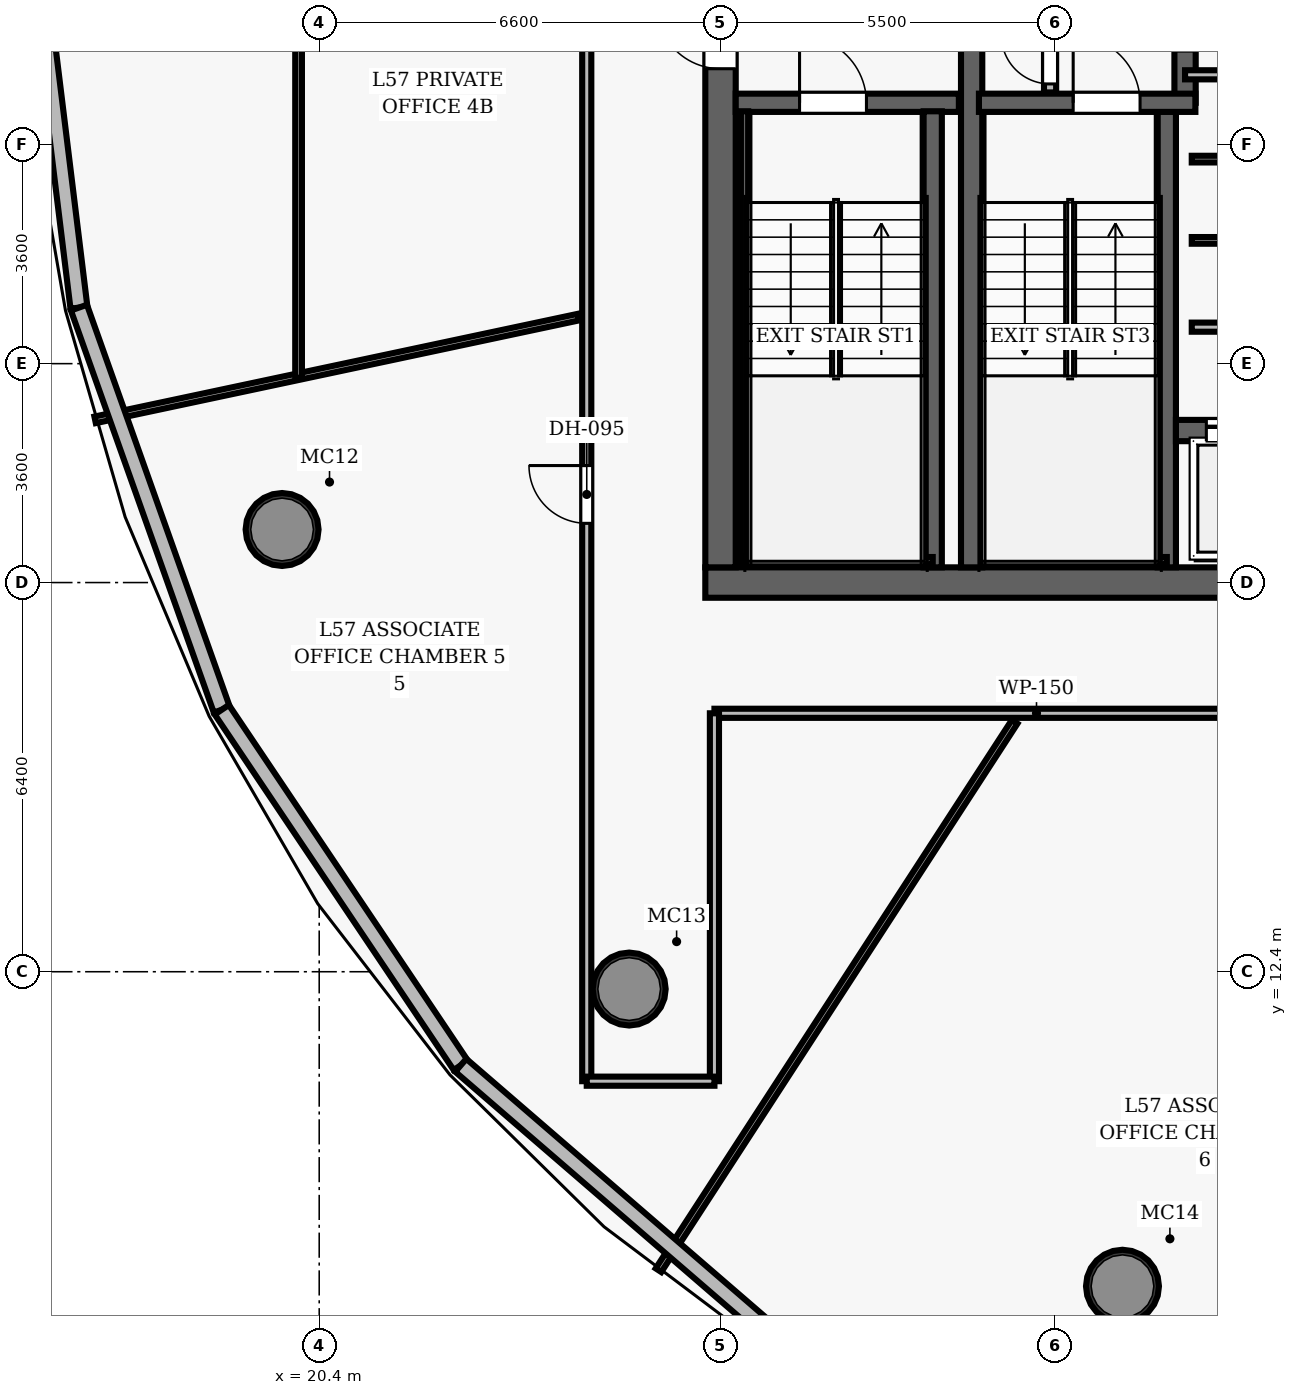
"""IFC4 building model, lengths in metres.
Left out: names, types, materials, properties, quantities, classifications, styles, units other than length and angle.
Written with IfcOpenShell. Run it as: python <this file> out.ifc"""

import sys

from ifc_helpers import new_model, si_unit, direction, frame, frame_2d, origin, origin_2d, place, context, subcontext, project, spatial, rectangle, hollow_circle, extrude, element, fill, save


model = new_model("IFC4")
c1 = context("Model", 3, precision=1e-05, world=origin(), true_north=direction((0.0, 1.0)))
c2 = subcontext(c1, "Body", "Model", "MODEL_VIEW")
j1 = project(units=[si_unit("LENGTHUNIT", "METRE"), si_unit("PLANEANGLEUNIT", "RADIAN")], contexts=[c1])
p1 = place(None, origin())
s1 = spatial("IfcSite", under=j1, at=p1, CompositionType="ELEMENT")
p2 = place(p1, origin())
s2 = spatial("IfcBuilding", under=s1, at=p2, CompositionType="ELEMENT")
p3 = place(p2, frame((0.0, 0.0, 225.1)))
s3 = spatial("IfcBuildingStorey", under=s2, at=p3, CompositionType="ELEMENT", Elevation=225.1)
p4 = place(p3, frame((26.75, 18.8, 0.0), z_axis=(0.0, 0.0, 1.0), x_axis=(1.0, 0.0, 0.0)))
e1 = element("IfcWall", 1, at=p4, inside=s3, PredefinedType="SHEAR", context=c2, shape_type="SweptSolid", body=[
    extrude(rectangle(XDim=22.5, YDim=0.5, at=frame_2d((11.25, 0.0))), origin(), (0.0, 0.0, 1.0), 3.85),
])
p5 = place(p4, frame((14.47, 0.0, 0.0)))
e2 = element("IfcOpeningElement", 2, at=p5, cuts=e1, PredefinedType="OPENING", context=c2, shape_type="SweptSolid", body=[
    extrude(rectangle(XDim=1.05, YDim=2.15, at=frame_2d((0.525, 1.075))), frame((0.0, 0.26, 0.0), z_axis=(0.0, -1.0, 0.0), x_axis=(1.0, 0.0, 0.0)), (0.0, 0.0, 1.0), 0.52),
])
p6 = place(p3, frame((27.0, 19.05, 0.0), z_axis=(0.0, 0.0, 1.0), x_axis=(0.0, 1.0, 0.0)))
e3 = element("IfcWall", 3, at=p6, inside=s3, PredefinedType="SHEAR", context=c2, shape_type="SweptSolid", body=[
    extrude(rectangle(XDim=13.9, YDim=0.5, at=frame_2d((6.95, 0.0))), origin(), (0.0, 0.0, 1.0), 3.85),
])
p7 = place(p6, frame((8.2, 0.0, 0.0)))
e4 = element("IfcOpeningElement", 4, at=p7, cuts=e3, PredefinedType="OPENING", context=c2, shape_type="SweptSolid", body=[
    extrude(rectangle(XDim=1.05, YDim=2.15, at=frame_2d((0.525, 1.075))), frame((0.0, 0.26, 0.0), z_axis=(0.0, -1.0, 0.0), x_axis=(1.0, 0.0, 0.0)), (0.0, 0.0, 1.0), 0.52),
])
p8 = place(p3, frame((31.13, 19.05, 0.0), z_axis=(0.0, 0.0, 1.0), x_axis=(0.0, 1.0, 0.0)))
e5 = element("IfcWall", 5, at=p8, inside=s3, PredefinedType="SHEAR", context=c2, shape_type="SweptSolid", body=[
    extrude(rectangle(XDim=13.9, YDim=0.35, at=frame_2d((6.95, 0.0))), origin(), (0.0, 0.0, 1.0), 3.85),
])
for number, where, z_axis, x_axis in (
    (6, (19.79, 19.673, 0.0), (0.0, 0.0, 1.0), (1.0, 0.0, 0.0)),
    (7, (25.498, 12.115, 0.0), (0.0, 0.0, 1.0), (1.0, 0.0, 0.0)),
    (8, (33.611, 7.228, 0.0), (0.0, 0.0, 1.0), (1.0, 0.0, 0.0)),
):
    element("IfcColumn", number, at=place(p3, frame(where, z_axis=z_axis, x_axis=x_axis)), inside=s3, PredefinedType="COLUMN", context=c2, shape_type="SweptSolid", body=[
        extrude(hollow_circle(Radius=0.6, WallThickness=0.05, at=origin_2d()), origin(), (0.0, 0.0, 1.0), 3.85),
    ])
p9 = place(p3, frame((27.25, 26.69, 0.0), z_axis=(0.0, 0.0, 1.0), x_axis=(1.0, 0.0, 0.0)))
e9 = element("IfcWall", 9, at=p9, inside=s3, PredefinedType="SHEAR", context=c2, shape_type="SweptSolid", body=[
    extrude(rectangle(XDim=3.67, YDim=0.3, at=frame_2d((1.835, 0.0))), origin(), (0.0, 0.0, 1.0), 3.85),
])
p10 = place(p9, frame((1.05, 0.0, 0.0)))
e10 = element("IfcOpeningElement", 10, at=p10, cuts=e9, PredefinedType="OPENING", context=c2, shape_type="SweptSolid", body=[
    extrude(rectangle(XDim=1.1, YDim=2.15, at=frame_2d((0.55, 1.075))), frame((0.0, 0.16, 0.0), z_axis=(0.0, -1.0, 0.0), x_axis=(1.0, 0.0, 0.0)), (0.0, 0.0, 1.0), 0.32),
])
p11 = place(p3, frame((30.49, 19.05, 0.0), z_axis=(0.0, 0.0, 1.0), x_axis=(0.0, 1.0, 0.0)))
e11 = element("IfcWall", 11, at=p11, inside=s3, PredefinedType="SHEAR", context=c2, shape_type="SweptSolid", body=[
    extrude(rectangle(XDim=7.5, YDim=0.3, at=frame_2d((3.75, 0.0))), origin(), (0.0, 0.0, 1.0), 3.85),
])
p12 = place(p3, frame((27.395, 19.1, 0.0), z_axis=(0.0, 0.0, 1.0), x_axis=(0.0, 1.0, 0.0)))
e12 = element("IfcWall", 12, at=p12, inside=s3, PredefinedType="SHEAR", context=c2, shape_type="SweptSolid", body=[
    extrude(rectangle(XDim=7.45, YDim=0.12, at=frame_2d((3.725, 0.0))), origin(), (0.0, 0.0, 1.0), 3.85),
])
p13 = place(p3, frame((27.395, 19.16, 0.0), z_axis=(0.0, 0.0, 1.0), x_axis=(1.0, 0.0, 0.0)))
e13 = element("IfcWall", 13, at=p13, inside=s3, PredefinedType="SHEAR", context=c2, shape_type="SweptSolid", body=[
    extrude(rectangle(XDim=3.095, YDim=0.12, at=frame_2d((1.547, 0.0))), origin(), (0.0, 0.0, 1.0), 3.85),
])
p14 = place(p3, frame((34.34, 19.05, 0.0), z_axis=(0.0, 0.0, 1.0), x_axis=(0.0, 1.0, 0.0)))
e14 = element("IfcWall", 14, at=p14, inside=s3, PredefinedType="SHEAR", context=c2, shape_type="SweptSolid", body=[
    extrude(rectangle(XDim=7.5, YDim=0.3, at=frame_2d((3.75, 0.0))), origin(), (0.0, 0.0, 1.0), 3.85),
])
p15 = place(p3, frame((34.64, 26.69, 0.0), z_axis=(0.0, 0.0, 1.0), x_axis=(0.0, 1.0, 0.0)))
e15 = element("IfcWall", 15, at=p15, inside=s3, PredefinedType="SHEAR", context=c2, shape_type="SweptSolid", body=[
    extrude(rectangle(XDim=6.26, YDim=0.35, at=frame_2d((3.13, 0.0))), origin(), (0.0, 0.0, 1.0), 3.85),
])
p16 = place(p15, frame((0.85, 0.0, 0.0)))
e16 = element("IfcOpeningElement", 16, at=p16, cuts=e15, PredefinedType="OPENING", context=c2, shape_type="SweptSolid", body=[
    extrude(rectangle(XDim=1.05, YDim=2.15, at=frame_2d((0.525, 1.075))), frame((0.0, 0.185, 0.0), z_axis=(0.0, -1.0, 0.0), x_axis=(1.0, 0.0, 0.0)), (0.0, 0.0, 1.0), 0.37),
])
p17 = place(p3, frame((31.25, 26.69, 0.0), z_axis=(0.0, 0.0, 1.0), x_axis=(1.0, 0.0, 0.0)))
e17 = element("IfcWall", 17, at=p17, inside=s3, PredefinedType="SHEAR", context=c2, shape_type="SweptSolid", body=[
    extrude(rectangle(XDim=3.56, YDim=0.3, at=frame_2d((1.78, 0.0))), origin(), (0.0, 0.0, 1.0), 3.85),
])
p18 = place(p17, frame((1.55, 0.0, 0.0)))
e18 = element("IfcOpeningElement", 18, at=p18, cuts=e17, PredefinedType="OPENING", context=c2, shape_type="SweptSolid", body=[
    extrude(rectangle(XDim=1.1, YDim=2.15, at=frame_2d((0.55, 1.075))), frame((0.0, 0.16, 0.0), z_axis=(0.0, -1.0, 0.0), x_axis=(1.0, 0.0, 0.0)), (0.0, 0.0, 1.0), 0.32),
])
p19 = place(p3, frame((31.3, 19.16, 0.0), z_axis=(0.0, 0.0, 1.0), x_axis=(1.0, 0.0, 0.0)))
e19 = element("IfcWall", 19, at=p19, inside=s3, PredefinedType="SHEAR", context=c2, shape_type="SweptSolid", body=[
    extrude(rectangle(XDim=3.04, YDim=0.12, at=frame_2d((1.52, 0.0))), origin(), (0.0, 0.0, 1.0), 3.85),
])
p20 = place(p3, frame((32.42, 26.86, 0.0), z_axis=(0.0, 0.0, 1.0), x_axis=(0.0, 1.0, 0.0)))
e20 = element("IfcWall", 20, at=p20, inside=s3, PredefinedType="PARTITIONING", context=c2, shape_type="SweptSolid", body=[
    extrude(rectangle(XDim=2.04, YDim=0.2, at=frame_2d((1.02, 0.0))), origin(), (0.0, 0.0, 1.0), 3.035),
])
p21 = place(p20, frame((0.14, 0.0, 0.0)))
e21 = element("IfcOpeningElement", 21, at=p21, cuts=e20, PredefinedType="OPENING", context=c2, shape_type="SweptSolid", body=[
    extrude(rectangle(XDim=0.8, YDim=2.05, at=frame_2d((0.4, 1.025))), frame((0.0, 0.11, 0.0), z_axis=(0.0, -1.0, 0.0), x_axis=(1.0, 0.0, 0.0)), (0.0, 0.0, 1.0), 0.22),
])
p22 = place(p3, frame((34.49, 21.3, 0.0), z_axis=(0.0, 0.0, 1.0), x_axis=(1.0, 0.0, 0.0)))
e22 = element("IfcWall", 22, at=p22, inside=s3, PredefinedType="SHEAR", context=c2, shape_type="SweptSolid", body=[
    extrude(rectangle(XDim=6.68, YDim=0.35, at=frame_2d((3.34, 0.0))), origin(), (0.0, 0.0, 1.0), 3.035),
])
p23 = place(p22, frame((0.5, 0.0, 0.0)))
e23 = element("IfcOpeningElement", 23, at=p23, cuts=e22, PredefinedType="OPENING", context=c2, shape_type="SweptSolid", body=[
    extrude(rectangle(XDim=0.9, YDim=2.15, at=frame_2d((0.45, 1.075))), frame((0.0, 0.185, 0.0), z_axis=(0.0, -1.0, 0.0), x_axis=(1.0, 0.0, 0.0)), (0.0, 0.0, 1.0), 0.37),
])
p24 = place(p22, frame((2.58, 0.0, 0.0)))
e24 = element("IfcOpeningElement", 24, at=p24, cuts=e22, PredefinedType="OPENING", context=c2, shape_type="SweptSolid", body=[
    extrude(rectangle(XDim=0.9, YDim=2.15, at=frame_2d((0.45, 1.075))), frame((0.0, 0.185, 0.0), z_axis=(0.0, -1.0, 0.0), x_axis=(1.0, 0.0, 0.0)), (0.0, 0.0, 1.0), 0.37),
])
p25 = place(p22, frame((4.66, 0.0, 0.0)))
e25 = element("IfcOpeningElement", 25, at=p25, cuts=e22, PredefinedType="OPENING", context=c2, shape_type="SweptSolid", body=[
    extrude(rectangle(XDim=0.9, YDim=2.15, at=frame_2d((0.45, 1.075))), frame((0.0, 0.185, 0.0), z_axis=(0.0, -1.0, 0.0), x_axis=(1.0, 0.0, 0.0)), (0.0, 0.0, 1.0), 0.37),
])
p26 = place(p3, frame((34.75, 23.0, 0.0), z_axis=(0.0, 0.0, 1.0), x_axis=(1.0, 0.0, 0.0)))
e26 = element("IfcWall", 26, at=p26, inside=s3, PredefinedType="PARTITIONING", context=c2, shape_type="SweptSolid", body=[
    extrude(rectangle(XDim=6.25, YDim=0.15, at=frame_2d((3.125, 0.0))), origin(), (0.0, 0.0, 1.0), 3.035),
])
p27 = place(p3, frame((34.64, 27.15, 0.0), z_axis=(0.0, 0.0, 1.0), x_axis=(1.0, 0.0, 0.0)))
e27 = element("IfcWall", 27, at=p27, inside=s3, PredefinedType="PARTITIONING", context=c2, shape_type="SweptSolid", body=[
    extrude(rectangle(XDim=6.36, YDim=0.15, at=frame_2d((3.18, 0.0))), origin(), (0.0, 0.0, 1.0), 3.035),
])
for number, where, z_axis, x_axis in (
    (28, (34.75, 24.427, 0.0), (0.0, 0.0, 1.0), (1.0, 0.0, 0.0)),
    (29, (34.75, 25.763, 0.0), (0.0, 0.0, 1.0), (1.0, 0.0, 0.0)),
):
    element("IfcWall", number, at=place(p3, frame(where, z_axis=z_axis, x_axis=x_axis)), inside=s3, PredefinedType="PARTITIONING", context=c2, shape_type="SweptSolid", body=[
        extrude(rectangle(XDim=6.25, YDim=0.11, at=frame_2d((3.125, 0.0))), origin(), (0.0, 0.0, 1.0), 3.035),
    ])
p28 = place(p3, frame((26.9, 16.65, 0.0), z_axis=(0.0, 0.0, 1.0), x_axis=(1.0, 0.0, 0.0)))
e30 = element("IfcWall", 30, at=p28, inside=s3, PredefinedType="PARTITIONING", context=c2, shape_type="SweptSolid", body=[
    extrude(rectangle(XDim=22.2, YDim=0.15, at=frame_2d((11.1, 0.0))), origin(), (0.0, 0.0, 1.0), 3.035),
])
p29 = place(p28, frame((10.744, 0.0, 0.0)))
e31 = element("IfcOpeningElement", 31, at=p29, cuts=e30, PredefinedType="OPENING", context=c2, shape_type="SweptSolid", body=[
    extrude(rectangle(XDim=0.95, YDim=2.15, at=frame_2d((0.475, 1.075))), frame((0.0, 0.085, 0.0), z_axis=(0.0, -1.0, 0.0), x_axis=(1.0, 0.0, 0.0)), (0.0, 0.0, 1.0), 0.17),
])
p30 = place(p28, frame((17.033, 0.0, 0.0)))
e32 = element("IfcOpeningElement", 32, at=p30, cuts=e30, PredefinedType="OPENING", context=c2, shape_type="SweptSolid", body=[
    extrude(rectangle(XDim=0.95, YDim=2.15, at=frame_2d((0.475, 1.075))), frame((0.0, 0.085, 0.0), z_axis=(0.0, -1.0, 0.0), x_axis=(1.0, 0.0, 0.0)), (0.0, 0.0, 1.0), 0.17),
])
p31 = place(p3, frame((24.8, 10.6, 0.0), z_axis=(0.0, 0.0, 1.0), x_axis=(0.0, 1.0, 0.0)))
e33 = element("IfcWall", 33, at=p31, inside=s3, PredefinedType="PARTITIONING", context=c2, shape_type="SweptSolid", body=[
    extrude(rectangle(XDim=30.8, YDim=0.15, at=frame_2d((15.4, 0.0))), origin(), (0.0, 0.0, 1.0), 3.035),
])
p32 = place(p31, frame((20.858, 0.0, 0.0)))
e34 = element("IfcOpeningElement", 34, at=p32, cuts=e33, PredefinedType="OPENING", context=c2, shape_type="SweptSolid", body=[
    extrude(rectangle(XDim=0.95, YDim=2.15, at=frame_2d((0.475, 1.075))), frame((0.0, 0.085, 0.0), z_axis=(0.0, -1.0, 0.0), x_axis=(1.0, 0.0, 0.0)), (0.0, 0.0, 1.0), 0.17),
])
p33 = place(p31, frame((9.174, 0.0, 0.0)))
e35 = element("IfcOpeningElement", 35, at=p33, cuts=e33, PredefinedType="OPENING", context=c2, shape_type="SweptSolid", body=[
    extrude(rectangle(XDim=0.95, YDim=2.15, at=frame_2d((0.475, 1.075))), frame((0.0, 0.085, 0.0), z_axis=(0.0, -1.0, 0.0), x_axis=(1.0, 0.0, 0.0)), (0.0, 0.0, 1.0), 0.17),
])
p34 = place(p3, frame((26.9, 10.6, 0.0), z_axis=(0.0, 0.0, 1.0), x_axis=(0.0, 1.0, 0.0)))
e36 = element("IfcWall", 36, at=p34, inside=s3, PredefinedType="PARTITIONING", context=c2, shape_type="SweptSolid", body=[
    extrude(rectangle(XDim=6.05, YDim=0.15, at=frame_2d((3.025, 0.0))), origin(), (0.0, 0.0, 1.0), 3.035),
])
p35 = place(p3, frame((24.8, 10.6, 0.0), z_axis=(0.0, 0.0, 1.0), x_axis=(1.0, 0.0, 0.0)))
e37 = element("IfcWall", 37, at=p35, inside=s3, PredefinedType="PARTITIONING", context=c2, shape_type="SweptSolid", body=[
    extrude(rectangle(XDim=2.1, YDim=0.15, at=frame_2d((1.05, 0.0))), origin(), (0.0, 0.0, 1.0), 3.035),
])
p36 = place(p3, frame((24.66, 23.165, 0.0), z_axis=(0.0, 0.0, 1.0), x_axis=(-0.978145481556, -0.207921660513, 0.0)))
e38 = element("IfcWall", 38, at=p36, inside=s3, PredefinedType="PARTITIONING", context=c2, shape_type="SweptSolid", body=[
    extrude(rectangle(XDim=8.123, YDim=0.11, at=frame_2d((4.062, 0.0))), origin(), (0.0, 0.0, 1.0), 3.035),
])
p37 = place(p3, frame((31.837, 16.51, 0.0), z_axis=(0.0, 0.0, 1.0), x_axis=(-0.544642773232, -0.838668140307, 0.0)))
e39 = element("IfcWall", 39, at=p37, inside=s3, PredefinedType="PARTITIONING", context=c2, shape_type="SweptSolid", body=[
    extrude(rectangle(XDim=10.754, YDim=0.11, at=frame_2d((5.377, 0.0))), origin(), (0.0, 0.0, 1.0), 3.035),
])
p38 = place(p3, frame((20.061, 22.167, 0.0), z_axis=(0.0, 0.0, 1.0), x_axis=(0.0, 1.0, 0.0)))
e40 = element("IfcWall", 40, at=p38, inside=s3, PredefinedType="PARTITIONING", context=c2, shape_type="SweptSolid", body=[
    extrude(rectangle(XDim=15.507, YDim=0.11, at=frame_2d((7.754, 0.0))), origin(), (0.0, 0.0, 1.0), 3.035),
])
p39 = place(p38, frame((7.154, 0.0, 0.0)))
e41 = element("IfcOpeningElement", 41, at=p39, cuts=e40, PredefinedType="OPENING", context=c2, shape_type="SweptSolid", body=[
    extrude(rectangle(XDim=1.2, YDim=2.15, at=frame_2d((0.6, 1.075))), frame((0.0, 0.065, 0.0), z_axis=(0.0, -1.0, 0.0), x_axis=(1.0, 0.0, 0.0)), (0.0, 0.0, 1.0), 0.13),
])
p40 = place(p3, frame((16.448, 23.322, 0.0), z_axis=(0.0, 0.0, 1.0), x_axis=(-0.121811070165, 0.992553304959, 0.0)))
e42 = element("IfcWall", 42, at=p40, inside=s3, PredefinedType="SOLIDWALL", context=c2, shape_type="SweptSolid", body=[
    extrude(rectangle(XDim=6.784, YDim=0.28, at=frame_2d((3.392, 0.0))), origin(), (0.0, 0.0, 1.0), 3.62),
])
p41 = place(p3, frame((18.798, 16.709, 0.0), z_axis=(0.0, 0.0, 1.0), x_axis=(-0.334775620093, 0.942297874449, 0.0)))
e43 = element("IfcWall", 43, at=p41, inside=s3, PredefinedType="SOLIDWALL", context=c2, shape_type="SweptSolid", body=[
    extrude(rectangle(XDim=7.018, YDim=0.28, at=frame_2d((3.509, 0.0))), origin(), (0.0, 0.0, 1.0), 3.62),
])
p42 = place(p3, frame((22.728, 10.861, 0.0), z_axis=(0.0, 0.0, 1.0), x_axis=(-0.557814907311, 0.829965378303, 0.0)))
e44 = element("IfcWall", 44, at=p42, inside=s3, PredefinedType="SOLIDWALL", context=c2, shape_type="SweptSolid", body=[
    extrude(rectangle(XDim=7.046, YDim=0.28, at=frame_2d((3.523, 0.0))), origin(), (0.0, 0.0, 1.0), 3.62),
])
p43 = place(p3, frame((28.061, 6.257, 0.0), z_axis=(0.0, 0.0, 1.0), x_axis=(-0.75694766073, 0.65347550751, 0.0)))
e45 = element("IfcWall", 45, at=p43, inside=s3, PredefinedType="SOLIDWALL", context=c2, shape_type="SweptSolid", body=[
    extrude(rectangle(XDim=7.045, YDim=0.28, at=frame_2d((3.523, 0.0))), origin(), (0.0, 0.0, 1.0), 3.62),
])
p44 = place(p10, origin())
e46 = element("IfcDoor", 46, at=p44, inside=s3, OperationType="SINGLE_SWING_LEFT", PredefinedType="DOOR", context=c2, shape_type="SweptSolid", body=[
    extrude(rectangle(XDim=1.1, YDim=2.15, at=frame_2d((0.55, 1.075))), frame((0.0, 0.025, 0.0), z_axis=(0.0, -1.0, 0.0), x_axis=(1.0, 0.0, 0.0)), (0.0, 0.0, 1.0), 0.05),
])
fill(e10, e46)
p45 = place(p7, origin())
e47 = element("IfcDoor", 47, at=p45, inside=s3, OperationType="SINGLE_SWING_RIGHT", PredefinedType="DOOR", context=c2, shape_type="SweptSolid", body=[
    extrude(rectangle(XDim=1.05, YDim=2.15, at=frame_2d((0.525, 1.075))), frame((0.0, 0.025, 0.0), z_axis=(0.0, -1.0, 0.0), x_axis=(1.0, 0.0, 0.0)), (0.0, 0.0, 1.0), 0.05),
])
fill(e4, e47)
p46 = place(p18, origin())
e48 = element("IfcDoor", 48, at=p46, inside=s3, OperationType="SINGLE_SWING_LEFT", PredefinedType="DOOR", context=c2, shape_type="SweptSolid", body=[
    extrude(rectangle(XDim=1.1, YDim=2.15, at=frame_2d((0.55, 1.075))), frame((0.0, 0.025, 0.0), z_axis=(0.0, -1.0, 0.0), x_axis=(1.0, 0.0, 0.0)), (0.0, 0.0, 1.0), 0.05),
])
fill(e18, e48)
p47 = place(p21, origin())
e49 = element("IfcDoor", 49, at=p47, inside=s3, OperationType="SINGLE_SWING_RIGHT", PredefinedType="DOOR", context=c2, shape_type="SweptSolid", body=[
    extrude(rectangle(XDim=0.8, YDim=2.05, at=frame_2d((0.4, 1.025))), frame((0.0, 0.025, 0.0), z_axis=(0.0, -1.0, 0.0), x_axis=(1.0, 0.0, 0.0)), (0.0, 0.0, 1.0), 0.05),
])
fill(e21, e49)
p48 = place(p33, origin())
e50 = element("IfcDoor", 50, at=p48, inside=s3, OperationType="SINGLE_SWING_RIGHT", PredefinedType="DOOR", context=c2, shape_type="SweptSolid", body=[
    extrude(rectangle(XDim=0.95, YDim=2.15, at=frame_2d((0.475, 1.075))), frame((0.0, 0.025, 0.0), z_axis=(0.0, -1.0, 0.0), x_axis=(1.0, 0.0, 0.0)), (0.0, 0.0, 1.0), 0.05),
])
fill(e35, e50)
p49 = place(p23, origin())
e51 = element("IfcDoor", 51, at=p49, inside=s3, OperationType="SLIDING_TO_LEFT", PredefinedType="DOOR", context=c2, shape_type="SweptSolid", body=[
    extrude(rectangle(XDim=0.9, YDim=2.15, at=frame_2d((0.45, 1.075))), frame((0.0, 0.025, 0.0), z_axis=(0.0, -1.0, 0.0), x_axis=(1.0, 0.0, 0.0)), (0.0, 0.0, 1.0), 0.05),
])
fill(e23, e51)
save(model, sys.argv[1])
